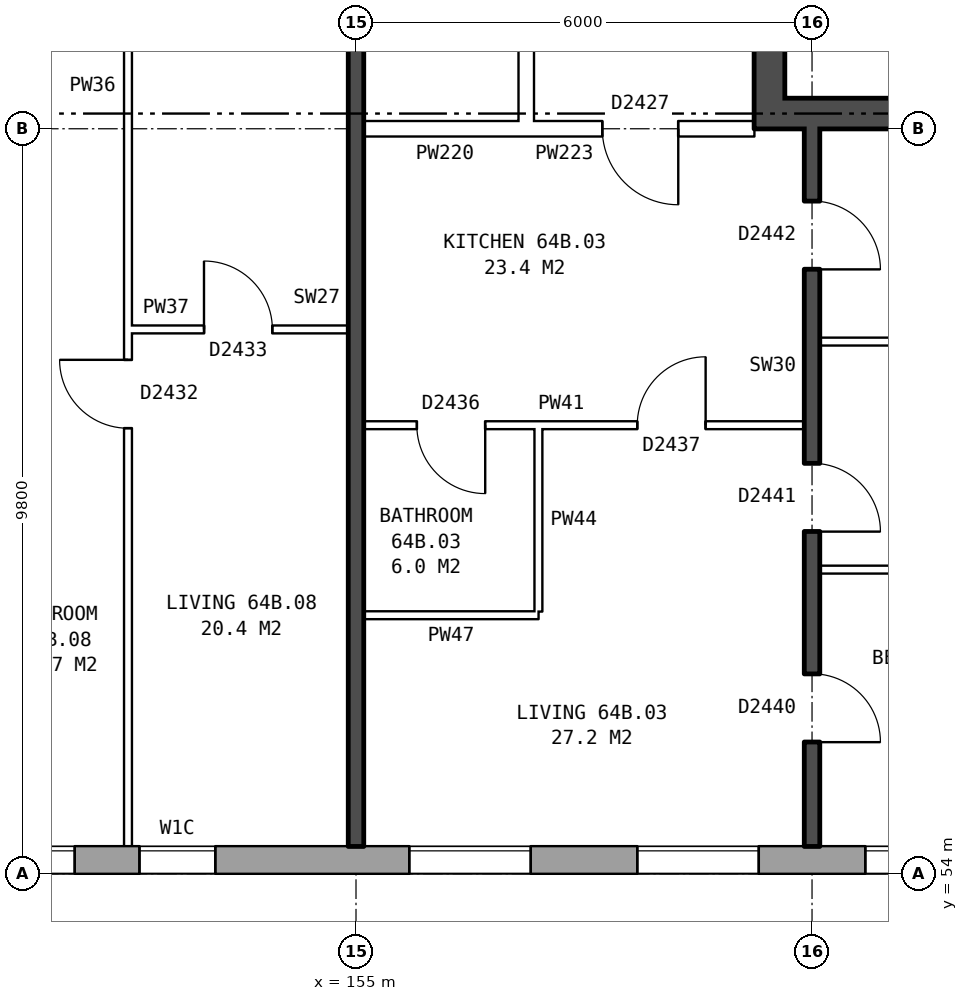
"""IFC4 building model, lengths in metres.
Left out: names, types, materials, properties, quantities, classifications, styles, units other than length and angle.
Written with IfcOpenShell. Run it as: python <this file> out.ifc"""

import sys

from ifc_helpers import new_model, si_unit, direction, frame, frame_2d, origin, place, context, subcontext, project, spatial, rectangle, extrude, element, fill, save


model = new_model("IFC4")
c1 = context("Model", 3, precision=1e-05, world=origin(), true_north=direction((0.0, 1.0)))
c2 = subcontext(c1, "Body", "Model", "MODEL_VIEW")
j1 = project(units=[si_unit("LENGTHUNIT", "METRE"), si_unit("PLANEANGLEUNIT", "RADIAN")], contexts=[c1])
p1 = place(None, origin())
s1 = spatial("IfcSite", under=j1, at=p1, CompositionType="ELEMENT")
p2 = place(p1, origin())
s2 = spatial("IfcBuilding", under=s1, at=p2, CompositionType="ELEMENT")
p3 = place(p2, frame((0.0, 0.0, 227.6)))
s3 = spatial("IfcBuildingStorey", under=s2, at=p3, CompositionType="ELEMENT", Elevation=227.6)
p4 = place(p3, frame((132.05, 54.18, 0.0), z_axis=(0.0, 0.0, 1.0), x_axis=(1.0, 0.0, 0.0)))
e1 = element("IfcWall", 1, at=p4, inside=s3, PredefinedType="STANDARD", context=c2, shape_type="SweptSolid", body=[
    extrude(rectangle(XDim=33.875, YDim=0.36, at=frame_2d((16.938, 0.0))), origin(), (0.0, 0.0, 1.0), 2.85),
])
p5 = place(p4, frame((2.65, 0.0, 0.8)))
e2 = element("IfcOpeningElement", 2, at=p5, cuts=e1, PredefinedType="OPENING", context=c2, shape_type="SweptSolid", body=[
    extrude(rectangle(XDim=1.6, YDim=1.8, at=frame_2d((0.8, 0.9))), frame((0.0, 0.19, 0.0), z_axis=(0.0, -1.0, 0.0), x_axis=(1.0, 0.0, 0.0)), (0.0, 0.0, 1.0), 0.38),
])
p6 = place(p4, frame((5.65, 0.0, 0.8)))
e3 = element("IfcOpeningElement", 3, at=p6, cuts=e1, PredefinedType="OPENING", context=c2, shape_type="SweptSolid", body=[
    extrude(rectangle(XDim=1.6, YDim=1.8, at=frame_2d((0.8, 0.9))), frame((0.0, 0.19, 0.0), z_axis=(0.0, -1.0, 0.0), x_axis=(1.0, 0.0, 0.0)), (0.0, 0.0, 1.0), 0.38),
])
p7 = place(p4, frame((8.65, 0.0, 0.8)))
e4 = element("IfcOpeningElement", 4, at=p7, cuts=e1, PredefinedType="OPENING", context=c2, shape_type="SweptSolid", body=[
    extrude(rectangle(XDim=1.6, YDim=1.8, at=frame_2d((0.8, 0.9))), frame((0.0, 0.19, 0.0), z_axis=(0.0, -1.0, 0.0), x_axis=(1.0, 0.0, 0.0)), (0.0, 0.0, 1.0), 0.38),
])
p8 = place(p4, frame((11.15, 0.0, 0.8)))
e5 = element("IfcOpeningElement", 5, at=p8, cuts=e1, PredefinedType="OPENING", context=c2, shape_type="SweptSolid", body=[
    extrude(rectangle(XDim=1.4, YDim=1.8, at=frame_2d((0.7, 0.9))), frame((0.0, 0.19, 0.0), z_axis=(0.0, -1.0, 0.0), x_axis=(1.0, 0.0, 0.0)), (0.0, 0.0, 1.0), 0.38),
])
p9 = place(p4, frame((15.05, 0.0, 0.8)))
e6 = element("IfcOpeningElement", 6, at=p9, cuts=e1, PredefinedType="OPENING", context=c2, shape_type="SweptSolid", body=[
    extrude(rectangle(XDim=1.6, YDim=1.8, at=frame_2d((0.8, 0.9))), frame((0.0, 0.19, 0.0), z_axis=(0.0, -1.0, 0.0), x_axis=(1.0, 0.0, 0.0)), (0.0, 0.0, 1.0), 0.38),
])
p10 = place(p4, frame((17.65, 0.0, 0.8)))
e7 = element("IfcOpeningElement", 7, at=p10, cuts=e1, PredefinedType="OPENING", context=c2, shape_type="SweptSolid", body=[
    extrude(rectangle(XDim=1.6, YDim=1.8, at=frame_2d((0.8, 0.9))), frame((0.0, 0.19, 0.0), z_axis=(0.0, -1.0, 0.0), x_axis=(1.0, 0.0, 0.0)), (0.0, 0.0, 1.0), 0.38),
])
p11 = place(p4, frame((20.1, 0.0, 0.35)))
e8 = element("IfcOpeningElement", 8, at=p11, cuts=e1, PredefinedType="OPENING", context=c2, shape_type="SweptSolid", body=[
    extrude(rectangle(XDim=1.0, YDim=1.8, at=frame_2d((0.5, 0.9))), frame((0.0, 0.19, 0.0), z_axis=(0.0, -1.0, 0.0), x_axis=(1.0, 0.0, 0.0)), (0.0, 0.0, 1.0), 0.38),
])
p12 = place(p4, frame((23.65, 0.0, 0.8)))
e9 = element("IfcOpeningElement", 9, at=p12, cuts=e1, PredefinedType="OPENING", context=c2, shape_type="SweptSolid", body=[
    extrude(rectangle(XDim=1.6, YDim=1.8, at=frame_2d((0.8, 0.9))), frame((0.0, 0.19, 0.0), z_axis=(0.0, -1.0, 0.0), x_axis=(1.0, 0.0, 0.0)), (0.0, 0.0, 1.0), 0.38),
])
p13 = place(p4, frame((26.65, 0.0, 0.8)))
e10 = element("IfcOpeningElement", 10, at=p13, cuts=e1, PredefinedType="OPENING", context=c2, shape_type="SweptSolid", body=[
    extrude(rectangle(XDim=1.6, YDim=1.8, at=frame_2d((0.8, 0.9))), frame((0.0, 0.19, 0.0), z_axis=(0.0, -1.0, 0.0), x_axis=(1.0, 0.0, 0.0)), (0.0, 0.0, 1.0), 0.38),
])
p14 = place(p4, frame((29.65, 0.0, 0.8)))
e11 = element("IfcOpeningElement", 11, at=p14, cuts=e1, PredefinedType="OPENING", context=c2, shape_type="SweptSolid", body=[
    extrude(rectangle(XDim=1.6, YDim=1.8, at=frame_2d((0.8, 0.9))), frame((0.0, 0.19, 0.0), z_axis=(0.0, -1.0, 0.0), x_axis=(1.0, 0.0, 0.0)), (0.0, 0.0, 1.0), 0.38),
])
p15 = place(p4, frame((12.85, 0.0, 1.7)))
e12 = element("IfcOpeningElement", 12, at=p15, cuts=e1, PredefinedType="OPENING", context=c2, shape_type="SweptSolid", body=[
    extrude(rectangle(XDim=0.6, YDim=0.9, at=frame_2d((0.3, 0.45))), frame((0.0, 0.19, 0.0), z_axis=(0.0, -1.0, 0.0), x_axis=(1.0, 0.0, 0.0)), (0.0, 0.0, 1.0), 0.38),
])
p16 = place(p3, frame((160.44, 76.2, 0.0), z_axis=(0.0, 0.0, 1.0), x_axis=(0.0, -1.0, 0.0)))
e13 = element("IfcWall", 13, at=p16, inside=s3, PredefinedType="SHEAR", context=c2, shape_type="SweptSolid", body=[
    extrude(rectangle(XDim=12.4, YDim=0.4, at=frame_2d((6.2, 0.0))), origin(), (0.0, 0.0, 1.0), 2.85),
])
p17 = place(p16, frame((1.325, 0.0, 0.0)))
e14 = element("IfcOpeningElement", 14, at=p17, cuts=e13, PredefinedType="OPENING", context=c2, shape_type="SweptSolid", body=[
    extrude(rectangle(XDim=1.1, YDim=2.1, at=frame_2d((0.55, 1.05))), frame((0.0, 0.21, 0.0), z_axis=(0.0, -1.0, 0.0), x_axis=(1.0, 0.0, 0.0)), (0.0, 0.0, 1.0), 0.42),
])
p18 = place(p16, frame((3.625, 0.0, 0.0)))
e15 = element("IfcOpeningElement", 15, at=p18, cuts=e13, PredefinedType="OPENING", context=c2, shape_type="SweptSolid", body=[
    extrude(rectangle(XDim=0.85, YDim=2.1, at=frame_2d((0.425, 1.05))), frame((0.0, 0.21, 0.0), z_axis=(0.0, -1.0, 0.0), x_axis=(1.0, 0.0, 0.0)), (0.0, 0.0, 1.0), 0.42),
])
p19 = place(p16, frame((5.775, 0.0, 0.0)))
e16 = element("IfcOpeningElement", 16, at=p19, cuts=e13, PredefinedType="OPENING", context=c2, shape_type="SweptSolid", body=[
    extrude(rectangle(XDim=0.85, YDim=2.1, at=frame_2d((0.425, 1.05))), frame((0.0, 0.21, 0.0), z_axis=(0.0, -1.0, 0.0), x_axis=(1.0, 0.0, 0.0)), (0.0, 0.0, 1.0), 0.42),
])
p20 = place(p16, frame((9.9, 0.0, 0.0)))
e17 = element("IfcOpeningElement", 17, at=p20, cuts=e13, PredefinedType="OPENING", context=c2, shape_type="SweptSolid", body=[
    extrude(rectangle(XDim=1.1, YDim=2.1, at=frame_2d((0.55, 1.05))), frame((0.0, 0.21, 0.0), z_axis=(0.0, -1.0, 0.0), x_axis=(1.0, 0.0, 0.0)), (0.0, 0.0, 1.0), 0.42),
])
p21 = place(p16, frame((8.125, 0.0, 0.0)))
e18 = element("IfcOpeningElement", 18, at=p21, cuts=e13, PredefinedType="OPENING", context=c2, shape_type="SweptSolid", body=[
    extrude(rectangle(XDim=0.85, YDim=2.1, at=frame_2d((0.425, 1.05))), frame((0.0, 0.21, 0.0), z_axis=(0.0, -1.0, 0.0), x_axis=(1.0, 0.0, 0.0)), (0.0, 0.0, 1.0), 0.42),
])
p22 = place(p3, frame((160.64, 64.0, 0.0), z_axis=(0.0, 0.0, 1.0), x_axis=(1.0, 0.0, 0.0)))
e19 = element("IfcWall", 19, at=p22, inside=s3, PredefinedType="SHEAR", context=c2, shape_type="SweptSolid", body=[
    extrude(rectangle(XDim=7.6, YDim=0.4, at=frame_2d((3.8, 0.0))), origin(), (0.0, 0.0, 1.0), 2.85),
])
p23 = place(p3, frame((157.24, 63.9, 0.0), z_axis=(0.0, 0.0, 1.0), x_axis=(0.0, 1.0, 0.0)))
e20 = element("IfcWall", 20, at=p23, inside=s3, PredefinedType="PARTITIONING", context=c2, shape_type="SweptSolid", body=[
    extrude(rectangle(XDim=12.2, YDim=0.2, at=frame_2d((6.1, 0.0))), origin(), (0.0, 0.0, 1.0), 2.85),
])
p24 = place(p23, frame((5.1, 0.0, 0.0)))
e21 = element("IfcOpeningElement", 21, at=p24, cuts=e20, PredefinedType="OPENING", context=c2, shape_type="SweptSolid", body=[
    extrude(rectangle(XDim=2.0, YDim=2.1, at=frame_2d((1.0, 1.05))), frame((0.0, 0.11, 0.0), z_axis=(0.0, -1.0, 0.0), x_axis=(1.0, 0.0, 0.0)), (0.0, 0.0, 1.0), 0.22),
])
p25 = place(p3, frame((155.1, 57.4, 0.0), z_axis=(0.0, 0.0, 1.0), x_axis=(1.0, 0.0, 0.0)))
e22 = element("IfcWall", 22, at=p25, inside=s3, PredefinedType="PARTITIONING", context=c2, shape_type="SweptSolid", body=[
    extrude(rectangle(XDim=2.3, YDim=0.1, at=frame_2d((1.15, 0.0))), origin(), (0.0, 0.0, 1.0), 2.85),
])
p26 = place(p3, frame((161.1, 58.0, 0.0), z_axis=(0.0, 0.0, 1.0), x_axis=(1.0, 0.0, 0.0)))
e23 = element("IfcWall", 23, at=p26, inside=s3, PredefinedType="PARTITIONING", context=c2, shape_type="SweptSolid", body=[
    extrude(rectangle(XDim=7.54, YDim=0.1, at=frame_2d((3.77, 0.0))), origin(), (0.0, 0.0, 1.0), 2.85),
])
p27 = place(p3, frame((155.1, 59.9, 0.0), z_axis=(0.0, 0.0, 1.0), x_axis=(1.0, 0.0, 0.0)))
e24 = element("IfcWall", 24, at=p27, inside=s3, PredefinedType="PARTITIONING", context=c2, shape_type="SweptSolid", body=[
    extrude(rectangle(XDim=5.8, YDim=0.1, at=frame_2d((2.9, 0.0))), origin(), (0.0, 0.0, 1.0), 2.85),
])
p28 = place(p27, frame((3.6, 0.0, 0.0)))
e25 = element("IfcOpeningElement", 25, at=p28, cuts=e24, PredefinedType="OPENING", context=c2, shape_type="SweptSolid", body=[
    extrude(rectangle(XDim=0.9, YDim=2.1, at=frame_2d((0.45, 1.05))), frame((0.0, 0.06, 0.0), z_axis=(0.0, -1.0, 0.0), x_axis=(1.0, 0.0, 0.0)), (0.0, 0.0, 1.0), 0.12),
])
p29 = place(p27, frame((0.7, 0.0, 0.0)))
e26 = element("IfcOpeningElement", 26, at=p29, cuts=e24, PredefinedType="OPENING", context=c2, shape_type="SweptSolid", body=[
    extrude(rectangle(XDim=0.9, YDim=2.1, at=frame_2d((0.45, 1.05))), frame((0.0, 0.06, 0.0), z_axis=(0.0, -1.0, 0.0), x_axis=(1.0, 0.0, 0.0)), (0.0, 0.0, 1.0), 0.12),
])
p30 = place(p3, frame((161.1, 61.0, 0.0), z_axis=(0.0, 0.0, 1.0), x_axis=(1.0, 0.0, 0.0)))
e27 = element("IfcWall", 27, at=p30, inside=s3, PredefinedType="PARTITIONING", context=c2, shape_type="SweptSolid", body=[
    extrude(rectangle(XDim=7.54, YDim=0.1, at=frame_2d((3.77, 0.0))), origin(), (0.0, 0.0, 1.0), 2.85),
])
p31 = place(p3, frame((152.0, 61.16, 0.0), z_axis=(0.0, 0.0, 1.0), x_axis=(1.0, 0.0, 0.0)))
e28 = element("IfcWall", 28, at=p31, inside=s3, PredefinedType="PARTITIONING", context=c2, shape_type="SweptSolid", body=[
    extrude(rectangle(XDim=2.9, YDim=0.1, at=frame_2d((1.45, 0.0))), origin(), (0.0, 0.0, 1.0), 2.85),
])
p32 = place(p31, frame((1.0, 0.0, 0.0)))
e29 = element("IfcOpeningElement", 29, at=p32, cuts=e28, PredefinedType="OPENING", context=c2, shape_type="SweptSolid", body=[
    extrude(rectangle(XDim=0.9, YDim=2.1, at=frame_2d((0.45, 1.05))), frame((0.0, 0.06, 0.0), z_axis=(0.0, -1.0, 0.0), x_axis=(1.0, 0.0, 0.0)), (0.0, 0.0, 1.0), 0.12),
])
p33 = place(p3, frame((155.1, 63.8, 0.0), z_axis=(0.0, 0.0, 1.0), x_axis=(1.0, 0.0, 0.0)))
e30 = element("IfcWall", 30, at=p33, inside=s3, PredefinedType="PARTITIONING", context=c2, shape_type="SweptSolid", body=[
    extrude(rectangle(XDim=2.14, YDim=0.2, at=frame_2d((1.07, 0.0))), origin(), (0.0, 0.0, 1.0), 2.85),
])
p34 = place(p3, frame((157.24, 63.8, 0.0), z_axis=(0.0, 0.0, 1.0), x_axis=(1.0, 0.0, 0.0)))
e31 = element("IfcWall", 31, at=p34, inside=s3, PredefinedType="PARTITIONING", context=c2, shape_type="SweptSolid", body=[
    extrude(rectangle(XDim=3.0, YDim=0.2, at=frame_2d((1.5, 0.0))), origin(), (0.0, 0.0, 1.0), 2.85),
])
p35 = place(p34, frame((1.0, 0.0, 0.0)))
e32 = element("IfcOpeningElement", 32, at=p35, cuts=e31, PredefinedType="OPENING", context=c2, shape_type="SweptSolid", body=[
    extrude(rectangle(XDim=1.0, YDim=2.1, at=frame_2d((0.5, 1.05))), frame((0.0, 0.11, 0.0), z_axis=(0.0, -1.0, 0.0), x_axis=(1.0, 0.0, 0.0)), (0.0, 0.0, 1.0), 0.22),
])
p36 = place(p3, frame((152.0, 54.36, 0.0), z_axis=(0.0, 0.0, 1.0), x_axis=(0.0, 1.0, 0.0)))
e33 = element("IfcWall", 33, at=p36, inside=s3, PredefinedType="PARTITIONING", context=c2, shape_type="SweptSolid", body=[
    extrude(rectangle(XDim=14.34, YDim=0.1, at=frame_2d((7.17, 0.0))), origin(), (0.0, 0.0, 1.0), 2.85),
])
p37 = place(p36, frame((5.5, 0.0, 0.0)))
e34 = element("IfcOpeningElement", 34, at=p37, cuts=e33, PredefinedType="OPENING", context=c2, shape_type="SweptSolid", body=[
    extrude(rectangle(XDim=0.9, YDim=2.1, at=frame_2d((0.45, 1.05))), frame((0.0, 0.06, 0.0), z_axis=(0.0, -1.0, 0.0), x_axis=(1.0, 0.0, 0.0)), (0.0, 0.0, 1.0), 0.12),
])
p38 = place(p36, frame((13.04, 0.0, 0.0)))
e35 = element("IfcOpeningElement", 35, at=p38, cuts=e33, PredefinedType="OPENING", context=c2, shape_type="SweptSolid", body=[
    extrude(rectangle(XDim=0.9, YDim=2.1, at=frame_2d((0.45, 1.05))), frame((0.0, 0.06, 0.0), z_axis=(0.0, -1.0, 0.0), x_axis=(1.0, 0.0, 0.0)), (0.0, 0.0, 1.0), 0.12),
])
p39 = place(p3, frame((155.0, 54.36, 0.0), z_axis=(0.0, 0.0, 1.0), x_axis=(0.0, 1.0, 0.0)))
e36 = element("IfcWall", 36, at=p39, inside=s3, PredefinedType="SOLIDWALL", context=c2, shape_type="SweptSolid", body=[
    extrude(rectangle(XDim=14.44, YDim=0.2, at=frame_2d((7.22, 0.0))), origin(), (0.0, 0.0, 1.0), 2.85),
])
p40 = place(p3, frame((157.4, 57.45, 0.0), z_axis=(0.0, 0.0, 1.0), x_axis=(0.0, 1.0, 0.0)))
e37 = element("IfcWall", 37, at=p40, inside=s3, PredefinedType="PARTITIONING", context=c2, shape_type="SweptSolid", body=[
    extrude(rectangle(XDim=2.4, YDim=0.1, at=frame_2d((1.2, 0.0))), origin(), (0.0, 0.0, 1.0), 2.85),
])
p41 = place(p3, frame((161.0, 54.36, 0.0), z_axis=(0.0, 0.0, 1.0), x_axis=(0.0, 1.0, 0.0)))
e38 = element("IfcWall", 38, at=p41, inside=s3, PredefinedType="SOLIDWALL", context=c2, shape_type="SweptSolid", body=[
    extrude(rectangle(XDim=9.44, YDim=0.2, at=frame_2d((4.72, 0.0))), origin(), (0.0, 0.0, 1.0), 2.85),
])
p42 = place(p41, frame((1.37, 0.0, 0.0)))
e39 = element("IfcOpeningElement", 39, at=p42, cuts=e38, PredefinedType="OPENING", context=c2, shape_type="SweptSolid", body=[
    extrude(rectangle(XDim=0.9, YDim=2.1, at=frame_2d((0.45, 1.05))), frame((0.0, 0.11, 0.0), z_axis=(0.0, -1.0, 0.0), x_axis=(1.0, 0.0, 0.0)), (0.0, 0.0, 1.0), 0.22),
])
p43 = place(p41, frame((4.14, 0.0, 0.0)))
e40 = element("IfcOpeningElement", 40, at=p43, cuts=e38, PredefinedType="OPENING", context=c2, shape_type="SweptSolid", body=[
    extrude(rectangle(XDim=0.9, YDim=2.1, at=frame_2d((0.45, 1.05))), frame((0.0, 0.11, 0.0), z_axis=(0.0, -1.0, 0.0), x_axis=(1.0, 0.0, 0.0)), (0.0, 0.0, 1.0), 0.22),
])
p44 = place(p41, frame((7.59, 0.0, 0.0)))
e41 = element("IfcOpeningElement", 41, at=p44, cuts=e38, PredefinedType="OPENING", context=c2, shape_type="SweptSolid", body=[
    extrude(rectangle(XDim=0.9, YDim=2.1, at=frame_2d((0.45, 1.05))), frame((0.0, 0.11, 0.0), z_axis=(0.0, -1.0, 0.0), x_axis=(1.0, 0.0, 0.0)), (0.0, 0.0, 1.0), 0.22),
])
p45 = place(p10, origin())
e42 = element("IfcWindow", 42, at=p45, inside=s3, PartitioningType="SINGLE_PANEL", PredefinedType="WINDOW", context=c2, shape_type="SweptSolid", body=[
    extrude(rectangle(XDim=1.6, YDim=1.8, at=frame_2d((0.8, 0.9))), frame((0.0, 0.15, 0.0), z_axis=(0.0, -1.0, 0.0), x_axis=(1.0, 0.0, 0.0)), (0.0, 0.0, 1.0), 0.06),
])
fill(e7, e42)
p46 = place(p11, origin())
e43 = element("IfcWindow", 43, at=p46, inside=s3, PartitioningType="SINGLE_PANEL", PredefinedType="WINDOW", context=c2, shape_type="SweptSolid", body=[
    extrude(rectangle(XDim=1.0, YDim=1.8, at=frame_2d((0.5, 0.9))), frame((0.0, 0.15, 0.0), z_axis=(0.0, -1.0, 0.0), x_axis=(1.0, 0.0, 0.0)), (0.0, 0.0, 1.0), 0.06),
])
fill(e8, e43)
p47 = place(p12, origin())
e44 = element("IfcWindow", 44, at=p47, inside=s3, PartitioningType="SINGLE_PANEL", PredefinedType="WINDOW", context=c2, shape_type="SweptSolid", body=[
    extrude(rectangle(XDim=1.6, YDim=1.8, at=frame_2d((0.8, 0.9))), frame((0.0, 0.15, 0.0), z_axis=(0.0, -1.0, 0.0), x_axis=(1.0, 0.0, 0.0)), (0.0, 0.0, 1.0), 0.06),
])
fill(e9, e44)
p48 = place(p13, origin())
e45 = element("IfcWindow", 45, at=p48, inside=s3, PartitioningType="SINGLE_PANEL", PredefinedType="WINDOW", context=c2, shape_type="SweptSolid", body=[
    extrude(rectangle(XDim=1.6, YDim=1.8, at=frame_2d((0.8, 0.9))), frame((0.0, 0.15, 0.0), z_axis=(0.0, -1.0, 0.0), x_axis=(1.0, 0.0, 0.0)), (0.0, 0.0, 1.0), 0.06),
])
fill(e10, e45)
p49 = place(p14, origin())
e46 = element("IfcWindow", 46, at=p49, inside=s3, PartitioningType="SINGLE_PANEL", PredefinedType="WINDOW", context=c2, shape_type="SweptSolid", body=[
    extrude(rectangle(XDim=1.6, YDim=1.8, at=frame_2d((0.8, 0.9))), frame((0.0, 0.15, 0.0), z_axis=(0.0, -1.0, 0.0), x_axis=(1.0, 0.0, 0.0)), (0.0, 0.0, 1.0), 0.06),
])
fill(e11, e46)
p50 = place(p42, frame((0.9, 0.0, 0.0), z_axis=(0.0, 0.0, 1.0), x_axis=(-1.0, 0.0, 0.0)))
e47 = element("IfcDoor", 47, at=p50, inside=s3, OperationType="SINGLE_SWING_RIGHT", PredefinedType="DOOR", context=c2, shape_type="SweptSolid", body=[
    extrude(rectangle(XDim=0.9, YDim=2.1, at=frame_2d((0.45, 1.05))), frame((0.0, 0.025, 0.0), z_axis=(0.0, -1.0, 0.0), x_axis=(1.0, 0.0, 0.0)), (0.0, 0.0, 1.0), 0.05),
])
fill(e39, e47)
p51 = place(p43, frame((0.9, 0.0, 0.0), z_axis=(0.0, 0.0, 1.0), x_axis=(-1.0, 0.0, 0.0)))
e48 = element("IfcDoor", 48, at=p51, inside=s3, OperationType="SINGLE_SWING_RIGHT", PredefinedType="DOOR", context=c2, shape_type="SweptSolid", body=[
    extrude(rectangle(XDim=0.9, YDim=2.1, at=frame_2d((0.45, 1.05))), frame((0.0, 0.025, 0.0), z_axis=(0.0, -1.0, 0.0), x_axis=(1.0, 0.0, 0.0)), (0.0, 0.0, 1.0), 0.05),
])
fill(e40, e48)
p52 = place(p44, frame((0.9, 0.0, 0.0), z_axis=(0.0, 0.0, 1.0), x_axis=(-1.0, 0.0, 0.0)))
e49 = element("IfcDoor", 49, at=p52, inside=s3, OperationType="SINGLE_SWING_RIGHT", PredefinedType="DOOR", context=c2, shape_type="SweptSolid", body=[
    extrude(rectangle(XDim=0.9, YDim=2.1, at=frame_2d((0.45, 1.05))), frame((0.0, 0.025, 0.0), z_axis=(0.0, -1.0, 0.0), x_axis=(1.0, 0.0, 0.0)), (0.0, 0.0, 1.0), 0.05),
])
fill(e41, e49)
p53 = place(p35, frame((1.0, 0.0, 0.0), z_axis=(0.0, 0.0, 1.0), x_axis=(-1.0, 0.0, 0.0)))
e50 = element("IfcDoor", 50, at=p53, inside=s3, OperationType="SINGLE_SWING_LEFT", PredefinedType="DOOR", context=c2, shape_type="SweptSolid", body=[
    extrude(rectangle(XDim=1.0, YDim=2.1, at=frame_2d((0.5, 1.05))), frame((0.0, 0.025, 0.0), z_axis=(0.0, -1.0, 0.0), x_axis=(1.0, 0.0, 0.0)), (0.0, 0.0, 1.0), 0.05),
])
fill(e32, e50)
p54 = place(p28, origin())
e51 = element("IfcDoor", 51, at=p54, inside=s3, OperationType="SINGLE_SWING_RIGHT", PredefinedType="DOOR", context=c2, shape_type="SweptSolid", body=[
    extrude(rectangle(XDim=0.9, YDim=2.1, at=frame_2d((0.45, 1.05))), frame((0.0, 0.025, 0.0), z_axis=(0.0, -1.0, 0.0), x_axis=(1.0, 0.0, 0.0)), (0.0, 0.0, 1.0), 0.05),
])
fill(e25, e51)
p55 = place(p29, frame((0.9, 0.0, 0.0), z_axis=(0.0, 0.0, 1.0), x_axis=(-1.0, 0.0, 0.0)))
e52 = element("IfcDoor", 52, at=p55, inside=s3, OperationType="SINGLE_SWING_LEFT", PredefinedType="DOOR", context=c2, shape_type="SweptSolid", body=[
    extrude(rectangle(XDim=0.9, YDim=2.1, at=frame_2d((0.45, 1.05))), frame((0.0, 0.025, 0.0), z_axis=(0.0, -1.0, 0.0), x_axis=(1.0, 0.0, 0.0)), (0.0, 0.0, 1.0), 0.05),
])
fill(e26, e52)
p56 = place(p37, origin())
e53 = element("IfcDoor", 53, at=p56, inside=s3, OperationType="SINGLE_SWING_RIGHT", PredefinedType="DOOR", context=c2, shape_type="SweptSolid", body=[
    extrude(rectangle(XDim=0.9, YDim=2.1, at=frame_2d((0.45, 1.05))), frame((0.0, 0.025, 0.0), z_axis=(0.0, -1.0, 0.0), x_axis=(1.0, 0.0, 0.0)), (0.0, 0.0, 1.0), 0.05),
])
fill(e34, e53)
p57 = place(p32, origin())
e54 = element("IfcDoor", 54, at=p57, inside=s3, OperationType="SINGLE_SWING_LEFT", PredefinedType="DOOR", context=c2, shape_type="SweptSolid", body=[
    extrude(rectangle(XDim=0.9, YDim=2.1, at=frame_2d((0.45, 1.05))), frame((0.0, 0.025, 0.0), z_axis=(0.0, -1.0, 0.0), x_axis=(1.0, 0.0, 0.0)), (0.0, 0.0, 1.0), 0.05),
])
fill(e29, e54)
save(model, sys.argv[1])
